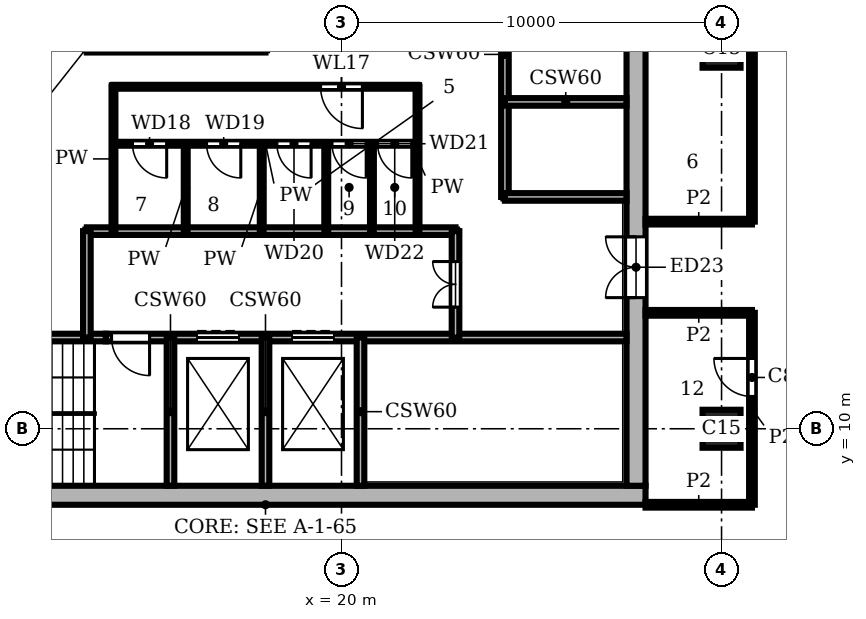
"""IFC4 building model, lengths in metres.
Left out: names, types, materials, properties, quantities, classifications, styles, units other than length and angle.
Written with IfcOpenShell. Run it as: python <this file> out.ifc"""

import sys

from ifc_helpers import new_model, si_unit, direction, frame, frame_2d, origin, origin_2d, place, context, subcontext, project, spatial, rectangle, extrude, element, fill, save


model = new_model("IFC4")
c1 = context("Model", 3, precision=1e-05, world=origin(), true_north=direction((0.0, 1.0)))
c2 = subcontext(c1, "Body", "Model", "MODEL_VIEW")
j1 = project(units=[si_unit("LENGTHUNIT", "METRE"), si_unit("PLANEANGLEUNIT", "RADIAN")], contexts=[c1])
p1 = place(None, origin())
s1 = spatial("IfcSite", under=j1, at=p1, CompositionType="ELEMENT")
p2 = place(p1, origin())
s2 = spatial("IfcBuilding", under=s1, at=p2, CompositionType="ELEMENT")
p3 = place(p2, frame((0.0, 0.0, 317.7)))
s3 = spatial("IfcBuildingStorey", under=s2, at=p3, CompositionType="ELEMENT", Elevation=317.7)
for number, where, z_axis, x_axis in (
    (1, (30.0, 10.0, 0.0), (0.0, 0.0, 1.0), (1.0, 0.0, 0.0)),
    (2, (30.0, 20.0, 0.0), (0.0, 0.0, 1.0), (1.0, 0.0, 0.0)),
):
    element("IfcColumn", number, at=place(p3, frame(where, z_axis=z_axis, x_axis=x_axis)), inside=s3, PredefinedType="COLUMN", context=c2, shape_type="SweptSolid", body=[
        extrude(rectangle(XDim=1.0, YDim=1.0, at=origin_2d()), origin(), (0.0, 0.0, 1.0), 3.9),
    ])
p4 = place(p3, frame((8.0, 8.25, 0.0), z_axis=(0.0, 0.0, 1.0), x_axis=(1.0, 0.0, 0.0)))
e3 = element("IfcWall", 3, at=p4, inside=s3, PredefinedType="SHEAR", context=c2, shape_type="SweptSolid", body=[
    extrude(rectangle(XDim=20.0, YDim=0.5, at=frame_2d((10.0, 0.0))), origin(), (0.0, 0.0, 1.0), 3.9),
])
p5 = place(p3, frame((27.75, 8.5, 0.0), z_axis=(0.0, 0.0, 1.0), x_axis=(0.0, 1.0, 0.0)))
e4 = element("IfcWall", 4, at=p5, inside=s3, PredefinedType="SHEAR", context=c2, shape_type="SweptSolid", body=[
    extrude(rectangle(XDim=19.0, YDim=0.5, at=frame_2d((9.5, 0.0))), origin(), (0.0, 0.0, 1.0), 3.9),
])
p6 = place(p5, frame((4.95, 0.0, 0.0)))
e5 = element("IfcOpeningElement", 5, at=p6, cuts=e4, PredefinedType="OPENING", context=c2, shape_type="SweptSolid", body=[
    extrude(rectangle(XDim=1.6, YDim=2.1, at=frame_2d((0.8, 1.05))), frame((0.0, 0.26, 0.0), z_axis=(0.0, -1.0, 0.0), x_axis=(1.0, 0.0, 0.0)), (0.0, 0.0, 1.0), 0.52),
])
p7 = place(p3, frame((8.5, 12.4, 0.0), z_axis=(0.0, 0.0, 1.0), x_axis=(1.0, 0.0, 0.0)))
e6 = element("IfcWall", 6, at=p7, inside=s3, PredefinedType="SHEAR", context=c2, shape_type="SweptSolid", body=[
    extrude(rectangle(XDim=5.3, YDim=0.2, at=frame_2d((2.65, 0.0))), origin(), (0.0, 0.0, 1.0), 3.58),
])
p8 = place(p3, frame((13.8, 12.4, 0.0), z_axis=(0.0, 0.0, 1.0), x_axis=(1.0, 0.0, 0.0)))
e7 = element("IfcWall", 7, at=p8, inside=s3, PredefinedType="SHEAR", context=c2, shape_type="SweptSolid", body=[
    extrude(rectangle(XDim=13.7, YDim=0.2, at=frame_2d((6.85, 0.0))), origin(), (0.0, 0.0, 1.0), 3.58),
])
p9 = place(p8, frame((2.4, 0.0, 0.0)))
e8 = element("IfcOpeningElement", 8, at=p9, cuts=e7, PredefinedType="OPENING", context=c2, shape_type="SweptSolid", body=[
    extrude(rectangle(XDim=1.1, YDim=2.1, at=frame_2d((0.55, 1.05))), frame((0.0, 0.11, 0.0), z_axis=(0.0, -1.0, 0.0), x_axis=(1.0, 0.0, 0.0)), (0.0, 0.0, 1.0), 0.22),
])
p10 = place(p8, frame((4.9, 0.0, 0.0)))
e9 = element("IfcOpeningElement", 9, at=p10, cuts=e7, PredefinedType="OPENING", context=c2, shape_type="SweptSolid", body=[
    extrude(rectangle(XDim=1.1, YDim=2.1, at=frame_2d((0.55, 1.05))), frame((0.0, 0.11, 0.0), z_axis=(0.0, -1.0, 0.0), x_axis=(1.0, 0.0, 0.0)), (0.0, 0.0, 1.0), 0.22),
])
p11 = place(p8, frame((0.15, 0.0, 0.0)))
e10 = element("IfcOpeningElement", 10, at=p11, cuts=e7, PredefinedType="OPENING", context=c2, shape_type="SweptSolid", body=[
    extrude(rectangle(XDim=1.0, YDim=2.1, at=frame_2d((0.5, 1.05))), frame((0.0, 0.11, 0.0), z_axis=(0.0, -1.0, 0.0), x_axis=(1.0, 0.0, 0.0)), (0.0, 0.0, 1.0), 0.22),
])
p12 = place(p3, frame((13.3, 15.2, 0.0), z_axis=(0.0, 0.0, 1.0), x_axis=(1.0, 0.0, 0.0)))
e11 = element("IfcWall", 11, at=p12, inside=s3, PredefinedType="SHEAR", context=c2, shape_type="SweptSolid", body=[
    extrude(rectangle(XDim=9.7, YDim=0.2, at=frame_2d((4.85, 0.0))), origin(), (0.0, 0.0, 1.0), 3.58),
])
p13 = place(p3, frame((24.3, 16.1, 0.0), z_axis=(0.0, 0.0, 1.0), x_axis=(1.0, 0.0, 0.0)))
e12 = element("IfcWall", 12, at=p13, inside=s3, PredefinedType="SHEAR", context=c2, shape_type="SweptSolid", body=[
    extrude(rectangle(XDim=3.2, YDim=0.2, at=frame_2d((1.6, 0.0))), origin(), (0.0, 0.0, 1.0), 3.58),
])
p14 = place(p3, frame((14.0, 17.5, 0.0), z_axis=(0.0, 0.0, 1.0), x_axis=(1.0, 0.0, 0.0)))
e13 = element("IfcWall", 13, at=p14, inside=s3, PredefinedType="PARTITIONING", context=c2, shape_type="SweptSolid", body=[
    extrude(rectangle(XDim=8.0, YDim=0.1, at=frame_2d((4.0, 0.0))), origin(), (0.0, 0.0, 1.0), 3.58),
])
p15 = place(p14, frame((0.5, 0.0, 0.0)))
e14 = element("IfcOpeningElement", 14, at=p15, cuts=e13, PredefinedType="OPENING", context=c2, shape_type="SweptSolid", body=[
    extrude(rectangle(XDim=0.9, YDim=2.1, at=frame_2d((0.45, 1.05))), frame((0.0, 0.06, 0.0), z_axis=(0.0, -1.0, 0.0), x_axis=(1.0, 0.0, 0.0)), (0.0, 0.0, 1.0), 0.12),
])
p16 = place(p14, frame((2.45, 0.0, 0.0)))
e15 = element("IfcOpeningElement", 15, at=p16, cuts=e13, PredefinedType="OPENING", context=c2, shape_type="SweptSolid", body=[
    extrude(rectangle(XDim=0.9, YDim=2.1, at=frame_2d((0.45, 1.05))), frame((0.0, 0.06, 0.0), z_axis=(0.0, -1.0, 0.0), x_axis=(1.0, 0.0, 0.0)), (0.0, 0.0, 1.0), 0.12),
])
p17 = place(p14, frame((4.3, 0.0, 0.0)))
e16 = element("IfcOpeningElement", 16, at=p17, cuts=e13, PredefinedType="OPENING", context=c2, shape_type="SweptSolid", body=[
    extrude(rectangle(XDim=0.9, YDim=2.1, at=frame_2d((0.45, 1.05))), frame((0.0, 0.06, 0.0), z_axis=(0.0, -1.0, 0.0), x_axis=(1.0, 0.0, 0.0)), (0.0, 0.0, 1.0), 0.12),
])
p18 = place(p14, frame((5.75, 0.0, 0.0)))
e17 = element("IfcOpeningElement", 17, at=p18, cuts=e13, PredefinedType="OPENING", context=c2, shape_type="SweptSolid", body=[
    extrude(rectangle(XDim=0.9, YDim=2.1, at=frame_2d((0.45, 1.05))), frame((0.0, 0.06, 0.0), z_axis=(0.0, -1.0, 0.0), x_axis=(1.0, 0.0, 0.0)), (0.0, 0.0, 1.0), 0.12),
])
p19 = place(p14, frame((6.95, 0.0, 0.0)))
e18 = element("IfcOpeningElement", 18, at=p19, cuts=e13, PredefinedType="OPENING", context=c2, shape_type="SweptSolid", body=[
    extrude(rectangle(XDim=0.9, YDim=2.1, at=frame_2d((0.45, 1.05))), frame((0.0, 0.06, 0.0), z_axis=(0.0, -1.0, 0.0), x_axis=(1.0, 0.0, 0.0)), (0.0, 0.0, 1.0), 0.12),
])
p20 = place(p3, frame((24.3, 18.6, 0.0), z_axis=(0.0, 0.0, 1.0), x_axis=(1.0, 0.0, 0.0)))
e19 = element("IfcWall", 19, at=p20, inside=s3, PredefinedType="SHEAR", context=c2, shape_type="SweptSolid", body=[
    extrude(rectangle(XDim=3.2, YDim=0.2, at=frame_2d((1.6, 0.0))), origin(), (0.0, 0.0, 1.0), 3.58),
])
p21 = place(p3, frame((14.0, 19.0, 0.0), z_axis=(0.0, 0.0, 1.0), x_axis=(1.0, 0.0, 0.0)))
e20 = element("IfcWall", 20, at=p21, inside=s3, PredefinedType="PARTITIONING", context=c2, shape_type="SweptSolid", body=[
    extrude(rectangle(XDim=8.0, YDim=0.1, at=frame_2d((4.0, 0.0))), origin(), (0.0, 0.0, 1.0), 3.58),
])
p22 = place(p21, frame((5.45, 0.0, 0.0)))
e21 = element("IfcOpeningElement", 21, at=p22, cuts=e20, PredefinedType="OPENING", context=c2, shape_type="SweptSolid", body=[
    extrude(rectangle(XDim=1.1, YDim=2.1, at=frame_2d((0.55, 1.05))), frame((0.0, 0.06, 0.0), z_axis=(0.0, -1.0, 0.0), x_axis=(1.0, 0.0, 0.0)), (0.0, 0.0, 1.0), 0.12),
])
p23 = place(p3, frame((13.3, 12.4, 0.0), z_axis=(0.0, 0.0, 1.0), x_axis=(0.0, 1.0, 0.0)))
e22 = element("IfcWall", 22, at=p23, inside=s3, PredefinedType="SHEAR", context=c2, shape_type="SweptSolid", body=[
    extrude(rectangle(XDim=2.8, YDim=0.2, at=frame_2d((1.4, 0.0))), origin(), (0.0, 0.0, 1.0), 3.58),
])
p24 = place(p3, frame((14.0, 15.2, 0.0), z_axis=(0.0, 0.0, 1.0), x_axis=(0.0, 1.0, 0.0)))
e23 = element("IfcWall", 23, at=p24, inside=s3, PredefinedType="PARTITIONING", context=c2, shape_type="SweptSolid", body=[
    extrude(rectangle(XDim=3.8, YDim=0.1, at=frame_2d((1.9, 0.0))), origin(), (0.0, 0.0, 1.0), 3.58),
])
p25 = place(p3, frame((15.5, 8.5, 0.0), z_axis=(0.0, 0.0, 1.0), x_axis=(0.0, 1.0, 0.0)))
e24 = element("IfcWall", 24, at=p25, inside=s3, PredefinedType="SHEAR", context=c2, shape_type="SweptSolid", body=[
    extrude(rectangle(XDim=3.9, YDim=0.2, at=frame_2d((1.95, 0.0))), origin(), (0.0, 0.0, 1.0), 3.58),
])
for number, where, z_axis, x_axis in (
    (25, (15.9, 15.2, 0.0), (0.0, 0.0, 1.0), (0.0, 1.0, 0.0)),
    (26, (17.9, 15.2, 0.0), (0.0, 0.0, 1.0), (0.0, 1.0, 0.0)),
):
    element("IfcWall", number, at=place(p3, frame(where, z_axis=z_axis, x_axis=x_axis)), inside=s3, PredefinedType="PARTITIONING", context=c2, shape_type="SweptSolid", body=[
        extrude(rectangle(XDim=2.3, YDim=0.1, at=frame_2d((1.15, 0.0))), origin(), (0.0, 0.0, 1.0), 3.58),
    ])
p26 = place(p3, frame((18.0, 8.5, 0.0), z_axis=(0.0, 0.0, 1.0), x_axis=(0.0, 1.0, 0.0)))
e27 = element("IfcWall", 27, at=p26, inside=s3, PredefinedType="SHEAR", context=c2, shape_type="SweptSolid", body=[
    extrude(rectangle(XDim=3.9, YDim=0.2, at=frame_2d((1.95, 0.0))), origin(), (0.0, 0.0, 1.0), 3.58),
])
p27 = place(p3, frame((19.6, 15.2, 0.0), z_axis=(0.0, 0.0, 1.0), x_axis=(0.0, 1.0, 0.0)))
e28 = element("IfcWall", 28, at=p27, inside=s3, PredefinedType="PARTITIONING", context=c2, shape_type="SweptSolid", body=[
    extrude(rectangle(XDim=2.3, YDim=0.1, at=frame_2d((1.15, 0.0))), origin(), (0.0, 0.0, 1.0), 3.58),
])
p28 = place(p3, frame((20.5, 8.5, 0.0), z_axis=(0.0, 0.0, 1.0), x_axis=(0.0, 1.0, 0.0)))
e29 = element("IfcWall", 29, at=p28, inside=s3, PredefinedType="SHEAR", context=c2, shape_type="SweptSolid", body=[
    extrude(rectangle(XDim=3.9, YDim=0.2, at=frame_2d((1.95, 0.0))), origin(), (0.0, 0.0, 1.0), 3.58),
])
p29 = place(p3, frame((20.8, 15.2, 0.0), z_axis=(0.0, 0.0, 1.0), x_axis=(0.0, 1.0, 0.0)))
e30 = element("IfcWall", 30, at=p29, inside=s3, PredefinedType="PARTITIONING", context=c2, shape_type="SweptSolid", body=[
    extrude(rectangle(XDim=2.3, YDim=0.1, at=frame_2d((1.15, 0.0))), origin(), (0.0, 0.0, 1.0), 3.58),
])
p30 = place(p3, frame((22.0, 15.2, 0.0), z_axis=(0.0, 0.0, 1.0), x_axis=(0.0, 1.0, 0.0)))
e31 = element("IfcWall", 31, at=p30, inside=s3, PredefinedType="PARTITIONING", context=c2, shape_type="SweptSolid", body=[
    extrude(rectangle(XDim=3.8, YDim=0.1, at=frame_2d((1.9, 0.0))), origin(), (0.0, 0.0, 1.0), 3.58),
])
p31 = place(p3, frame((23.0, 12.4, 0.0), z_axis=(0.0, 0.0, 1.0), x_axis=(0.0, 1.0, 0.0)))
e32 = element("IfcWall", 32, at=p31, inside=s3, PredefinedType="SHEAR", context=c2, shape_type="SweptSolid", body=[
    extrude(rectangle(XDim=2.8, YDim=0.2, at=frame_2d((1.4, 0.0))), origin(), (0.0, 0.0, 1.0), 3.58),
])
p32 = place(p31, frame((0.8, 0.0, 0.0)))
e33 = element("IfcOpeningElement", 33, at=p32, cuts=e32, PredefinedType="OPENING", context=c2, shape_type="SweptSolid", body=[
    extrude(rectangle(XDim=1.2, YDim=2.1, at=frame_2d((0.6, 1.05))), frame((0.0, 0.11, 0.0), z_axis=(0.0, -1.0, 0.0), x_axis=(1.0, 0.0, 0.0)), (0.0, 0.0, 1.0), 0.22),
])
p33 = place(p3, frame((24.3, 16.1, 0.0), z_axis=(0.0, 0.0, 1.0), x_axis=(0.0, 1.0, 0.0)))
e34 = element("IfcWall", 34, at=p33, inside=s3, PredefinedType="SHEAR", context=c2, shape_type="SweptSolid", body=[
    extrude(rectangle(XDim=7.5, YDim=0.2, at=frame_2d((3.75, 0.0))), origin(), (0.0, 0.0, 1.0), 3.58),
])
p34 = place(p33, frame((5.7, 0.0, 0.0)))
e35 = element("IfcOpeningElement", 35, at=p34, cuts=e34, PredefinedType="OPENING", context=c2, shape_type="SweptSolid", body=[
    extrude(rectangle(XDim=1.1, YDim=2.1, at=frame_2d((0.55, 1.05))), frame((0.0, 0.11, 0.0), z_axis=(0.0, -1.0, 0.0), x_axis=(1.0, 0.0, 0.0)), (0.0, 0.0, 1.0), 0.22),
])
p35 = place(p3, frame((30.8, 8.0, 0.0), z_axis=(0.0, 0.0, 1.0), x_axis=(0.0, 1.0, 0.0)))
e36 = element("IfcWall", 36, at=p35, inside=s3, PredefinedType="PARTITIONING", context=c2, shape_type="SweptSolid", body=[
    extrude(rectangle(XDim=5.05, YDim=0.15, at=frame_2d((2.525, 0.0))), origin(), (0.0, 0.0, 1.0), 3.58),
])
p36 = place(p35, frame((2.85, 0.0, 0.0)))
e37 = element("IfcOpeningElement", 37, at=p36, cuts=e36, PredefinedType="OPENING", context=c2, shape_type="SweptSolid", body=[
    extrude(rectangle(XDim=1.0, YDim=2.1, at=frame_2d((0.5, 1.05))), frame((0.0, 0.085, 0.0), z_axis=(0.0, -1.0, 0.0), x_axis=(1.0, 0.0, 0.0)), (0.0, 0.0, 1.0), 0.17),
])
p37 = place(p3, frame((30.8, 15.45, 0.0), z_axis=(0.0, 0.0, 1.0), x_axis=(0.0, 1.0, 0.0)))
e38 = element("IfcWall", 38, at=p37, inside=s3, PredefinedType="PARTITIONING", context=c2, shape_type="SweptSolid", body=[
    extrude(rectangle(XDim=15.15, YDim=0.15, at=frame_2d((7.575, 0.0))), origin(), (0.0, 0.0, 1.0), 3.58),
])
p38 = place(p37, frame((7.6, 0.0, 0.0)))
e39 = element("IfcOpeningElement", 39, at=p38, cuts=e38, PredefinedType="OPENING", context=c2, shape_type="SweptSolid", body=[
    extrude(rectangle(XDim=1.0, YDim=2.1, at=frame_2d((0.5, 1.05))), frame((0.0, 0.085, 0.0), z_axis=(0.0, -1.0, 0.0), x_axis=(1.0, 0.0, 0.0)), (0.0, 0.0, 1.0), 0.17),
])
for number, where, z_axis, x_axis in (
    (40, (28.0, 8.0, 0.0), (0.0, 0.0, 1.0), (1.0, 0.0, 0.0)),
    (41, (28.0, 13.05, 0.0), (0.0, 0.0, 1.0), (1.0, 0.0, 0.0)),
    (42, (28.0, 15.45, 0.0), (0.0, 0.0, 1.0), (1.0, 0.0, 0.0)),
):
    element("IfcWall", number, at=place(p3, frame(where, z_axis=z_axis, x_axis=x_axis)), inside=s3, PredefinedType="PARTITIONING", context=c2, shape_type="SweptSolid", body=[
        extrude(rectangle(XDim=2.8, YDim=0.15, at=frame_2d((1.4, 0.0))), origin(), (0.0, 0.0, 1.0), 3.58),
    ])
p39 = place(p9, origin())
e43 = element("IfcDoor", 43, at=p39, inside=s3, OperationType="DOUBLE_DOOR_SLIDING", PredefinedType="DOOR", context=c2, shape_type="SweptSolid", body=[
    extrude(rectangle(XDim=1.1, YDim=2.1, at=frame_2d((0.55, 1.05))), frame((0.0, 0.025, 0.0), z_axis=(0.0, -1.0, 0.0), x_axis=(1.0, 0.0, 0.0)), (0.0, 0.0, 1.0), 0.05),
])
fill(e8, e43)
p40 = place(p10, origin())
e44 = element("IfcDoor", 44, at=p40, inside=s3, OperationType="DOUBLE_DOOR_SLIDING", PredefinedType="DOOR", context=c2, shape_type="SweptSolid", body=[
    extrude(rectangle(XDim=1.1, YDim=2.1, at=frame_2d((0.55, 1.05))), frame((0.0, 0.025, 0.0), z_axis=(0.0, -1.0, 0.0), x_axis=(1.0, 0.0, 0.0)), (0.0, 0.0, 1.0), 0.05),
])
fill(e9, e44)
p41 = place(p11, frame((1.0, 0.0, 0.0), z_axis=(0.0, 0.0, 1.0), x_axis=(-1.0, 0.0, 0.0)))
e45 = element("IfcDoor", 45, at=p41, inside=s3, OperationType="SINGLE_SWING_LEFT", PredefinedType="DOOR", context=c2, shape_type="SweptSolid", body=[
    extrude(rectangle(XDim=1.0, YDim=2.1, at=frame_2d((0.5, 1.05))), frame((0.0, 0.025, 0.0), z_axis=(0.0, -1.0, 0.0), x_axis=(1.0, 0.0, 0.0)), (0.0, 0.0, 1.0), 0.05),
])
fill(e10, e45)
p42 = place(p32, origin())
e46 = element("IfcDoor", 46, at=p42, inside=s3, OperationType="DOUBLE_DOOR_SINGLE_SWING", PredefinedType="DOOR", context=c2, shape_type="SweptSolid", body=[
    extrude(rectangle(XDim=1.2, YDim=2.1, at=frame_2d((0.6, 1.05))), frame((0.0, 0.025, 0.0), z_axis=(0.0, -1.0, 0.0), x_axis=(1.0, 0.0, 0.0)), (0.0, 0.0, 1.0), 0.05),
])
fill(e33, e46)
p43 = place(p22, frame((1.1, 0.0, 0.0), z_axis=(0.0, 0.0, 1.0), x_axis=(-1.0, 0.0, 0.0)))
e47 = element("IfcDoor", 47, at=p43, inside=s3, OperationType="SINGLE_SWING_LEFT", PredefinedType="DOOR", context=c2, shape_type="SweptSolid", body=[
    extrude(rectangle(XDim=1.1, YDim=2.1, at=frame_2d((0.55, 1.05))), frame((0.0, 0.025, 0.0), z_axis=(0.0, -1.0, 0.0), x_axis=(1.0, 0.0, 0.0)), (0.0, 0.0, 1.0), 0.05),
])
fill(e21, e47)
p44 = place(p15, frame((0.9, 0.0, 0.0), z_axis=(0.0, 0.0, 1.0), x_axis=(-1.0, 0.0, 0.0)))
e48 = element("IfcDoor", 48, at=p44, inside=s3, OperationType="SINGLE_SWING_LEFT", PredefinedType="DOOR", context=c2, shape_type="SweptSolid", body=[
    extrude(rectangle(XDim=0.9, YDim=2.1, at=frame_2d((0.45, 1.05))), frame((0.0, 0.025, 0.0), z_axis=(0.0, -1.0, 0.0), x_axis=(1.0, 0.0, 0.0)), (0.0, 0.0, 1.0), 0.05),
])
fill(e14, e48)
p45 = place(p16, frame((0.9, 0.0, 0.0), z_axis=(0.0, 0.0, 1.0), x_axis=(-1.0, 0.0, 0.0)))
e49 = element("IfcDoor", 49, at=p45, inside=s3, OperationType="SINGLE_SWING_LEFT", PredefinedType="DOOR", context=c2, shape_type="SweptSolid", body=[
    extrude(rectangle(XDim=0.9, YDim=2.1, at=frame_2d((0.45, 1.05))), frame((0.0, 0.025, 0.0), z_axis=(0.0, -1.0, 0.0), x_axis=(1.0, 0.0, 0.0)), (0.0, 0.0, 1.0), 0.05),
])
fill(e15, e49)
p46 = place(p17, frame((0.9, 0.0, 0.0), z_axis=(0.0, 0.0, 1.0), x_axis=(-1.0, 0.0, 0.0)))
e50 = element("IfcDoor", 50, at=p46, inside=s3, OperationType="SINGLE_SWING_LEFT", PredefinedType="DOOR", context=c2, shape_type="SweptSolid", body=[
    extrude(rectangle(XDim=0.9, YDim=2.1, at=frame_2d((0.45, 1.05))), frame((0.0, 0.025, 0.0), z_axis=(0.0, -1.0, 0.0), x_axis=(1.0, 0.0, 0.0)), (0.0, 0.0, 1.0), 0.05),
])
fill(e16, e50)
p47 = place(p18, frame((0.9, 0.0, 0.0), z_axis=(0.0, 0.0, 1.0), x_axis=(-1.0, 0.0, 0.0)))
e51 = element("IfcDoor", 51, at=p47, inside=s3, OperationType="SINGLE_SWING_LEFT", PredefinedType="DOOR", context=c2, shape_type="SweptSolid", body=[
    extrude(rectangle(XDim=0.9, YDim=2.1, at=frame_2d((0.45, 1.05))), frame((0.0, 0.025, 0.0), z_axis=(0.0, -1.0, 0.0), x_axis=(1.0, 0.0, 0.0)), (0.0, 0.0, 1.0), 0.05),
])
fill(e17, e51)
p48 = place(p19, frame((0.9, 0.0, 0.0), z_axis=(0.0, 0.0, 1.0), x_axis=(-1.0, 0.0, 0.0)))
e52 = element("IfcDoor", 52, at=p48, inside=s3, OperationType="SINGLE_SWING_LEFT", PredefinedType="DOOR", context=c2, shape_type="SweptSolid", body=[
    extrude(rectangle(XDim=0.9, YDim=2.1, at=frame_2d((0.45, 1.05))), frame((0.0, 0.025, 0.0), z_axis=(0.0, -1.0, 0.0), x_axis=(1.0, 0.0, 0.0)), (0.0, 0.0, 1.0), 0.05),
])
fill(e18, e52)
p49 = place(p6, origin())
e53 = element("IfcDoor", 53, at=p49, inside=s3, OperationType="DOUBLE_DOOR_SINGLE_SWING", PredefinedType="DOOR", context=c2, shape_type="SweptSolid", body=[
    extrude(rectangle(XDim=1.6, YDim=2.1, at=frame_2d((0.8, 1.05))), frame((0.0, 0.025, 0.0), z_axis=(0.0, -1.0, 0.0), x_axis=(1.0, 0.0, 0.0)), (0.0, 0.0, 1.0), 0.05),
])
fill(e5, e53)
p50 = place(p36, origin())
e54 = element("IfcDoor", 54, at=p50, inside=s3, OperationType="SINGLE_SWING_RIGHT", PredefinedType="DOOR", context=c2, shape_type="SweptSolid", body=[
    extrude(rectangle(XDim=1.0, YDim=2.1, at=frame_2d((0.5, 1.05))), frame((0.0, 0.025, 0.0), z_axis=(0.0, -1.0, 0.0), x_axis=(1.0, 0.0, 0.0)), (0.0, 0.0, 1.0), 0.05),
])
fill(e37, e54)
save(model, sys.argv[1])
